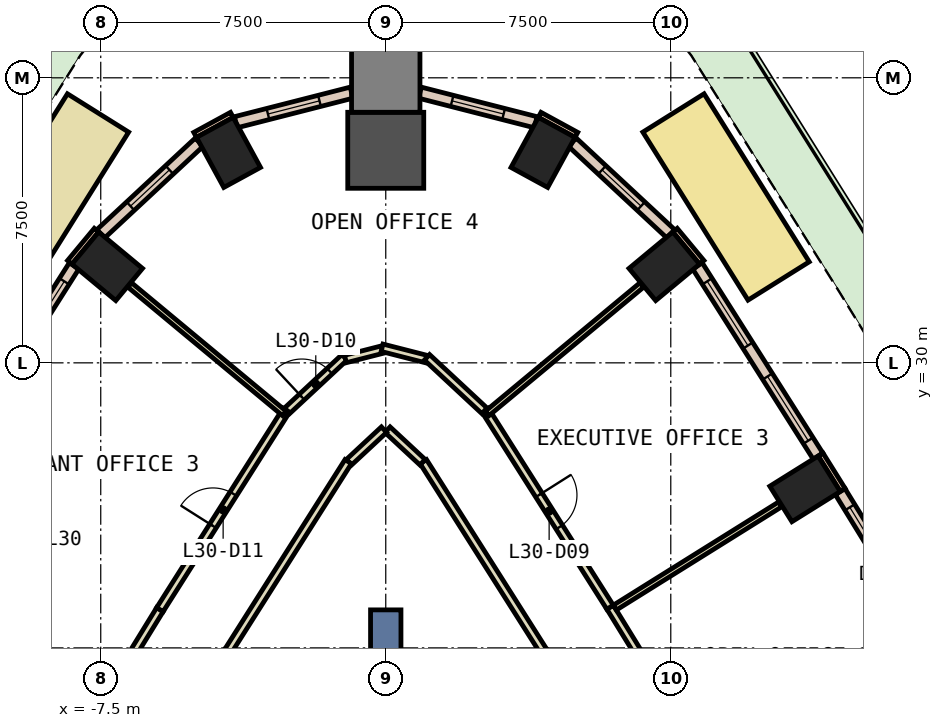
"""IFC4 building model, lengths in metres.
Left out: names, types, materials, properties, quantities, classifications, styles, units other than length and angle.
Written with IfcOpenShell. Run it as: python <this file> out.ifc"""

import sys

from ifc_helpers import new_model, si_unit, direction, frame, frame_2d, origin, origin_2d, place, context, subcontext, project, spatial, rectangle, extrude, element, fill, save


model = new_model("IFC4")
c1 = context("Model", 3, precision=1e-05, world=origin(), true_north=direction((0.0, 1.0)))
c2 = subcontext(c1, "Body", "Model", "MODEL_VIEW")
j1 = project(units=[si_unit("LENGTHUNIT", "METRE"), si_unit("PLANEANGLEUNIT", "RADIAN")], contexts=[c1])
p1 = place(None, origin())
s1 = spatial("IfcSite", under=j1, at=p1, CompositionType="ELEMENT")
p2 = place(p1, origin())
s2 = spatial("IfcBuilding", under=s1, at=p2, CompositionType="ELEMENT")
p3 = place(p2, frame((0.0, 0.0, 138.2)))
s3 = spatial("IfcBuildingStorey", under=s2, at=p3, CompositionType="ELEMENT", Elevation=138.2)
for number, where, z_axis, x_axis in (
    (1, (11.033, 26.684, 0.0), (0.0, 0.0, 1.0), (-0.53, 0.848, 0.0)),
    (2, (7.329, 32.541, 0.0), (0.0, 0.0, 1.0), (-0.639, 0.769, 0.0)),
    (3, (4.138, 35.537, 0.0), (0.0, 0.0, 1.0), (-0.878, 0.479, 0.0)),
):
    element("IfcColumn", number, at=place(p3, frame(where, z_axis=z_axis, x_axis=x_axis)), inside=s3, PredefinedType="COLUMN", context=c2, shape_type="SweptSolid", body=[
        extrude(rectangle(XDim=1.1, YDim=1.5, at=origin_2d()), origin(), (0.0, 0.0, 1.0), 3.8),
    ])
p4 = place(p3, frame((0.0, 35.593, 0.0), z_axis=(0.0, 0.0, 1.0), x_axis=(0.0, 1.0, 0.0)))
e4 = element("IfcColumn", 4, at=p4, inside=s3, PredefinedType="COLUMN", context=c2, shape_type="SweptSolid", body=[
    extrude(rectangle(XDim=2.0, YDim=2.0, at=origin_2d()), origin(), (0.0, 0.0, 1.0), 3.8),
])
for number, where, z_axis, x_axis in (
    (5, (-4.138, 35.537, 0.0), (0.0, 0.0, 1.0), (0.878, 0.479, 0.0)),
    (6, (-7.329, 32.541, 0.0), (0.0, 0.0, 1.0), (0.639, 0.769, 0.0)),
):
    element("IfcColumn", number, at=place(p3, frame(where, z_axis=z_axis, x_axis=x_axis)), inside=s3, PredefinedType="COLUMN", context=c2, shape_type="SweptSolid", body=[
        extrude(rectangle(XDim=1.1, YDim=1.5, at=origin_2d()), origin(), (0.0, 0.0, 1.0), 3.8),
    ])
p5 = place(p3, frame((0.0, 37.493, 0.0), z_axis=(0.0, 0.0, 1.0), x_axis=(0.0, 1.0, 0.0)))
e7 = element("IfcColumn", 7, at=p5, inside=s3, PredefinedType="COLUMN", context=c2, shape_type="SweptSolid", body=[
    extrude(rectangle(XDim=1.8, YDim=1.8, at=origin_2d()), origin(), (0.0, 0.0, 1.0), 3.8),
])
p6 = place(p3, frame((0.0, 14.5, -0.6), z_axis=(0.0, 0.0, 1.0), x_axis=(0.0, 1.0, 0.0)))
e8 = element("IfcWall", 8, at=p6, inside=s3, PredefinedType="SHEAR", context=c2, shape_type="SweptSolid", body=[
    extrude(rectangle(XDim=9.0, YDim=0.8, at=frame_2d((4.5, 0.0))), origin(), (0.0, 0.0, 1.0), 4.4),
])
for number, where, z_axis, x_axis in (
    (9, (5.016, 35.998, 0.0), (0.0, 0.0, 1.0), (-0.878, 0.479, 0.0)),
    (10, (-4.05, 36.525, 0.0), (0.0, 0.0, 1.0), (-0.878, -0.479, 0.0)),
):
    element("IfcWall", number, at=place(p3, frame(where, z_axis=z_axis, x_axis=x_axis)), inside=s3, PredefinedType="STANDARD", context=c2, shape_type="SweptSolid", body=[
        extrude(rectangle(XDim=1.1, YDim=0.15, at=frame_2d((0.55, 0.0))), origin(), (0.0, 0.0, 1.0), 3.8),
    ])
p7 = place(p3, frame((12.024, 26.655, 0.0), z_axis=(0.0, 0.0, 1.0), x_axis=(-0.52997899071, 0.848010771987, 0.0)))
e11 = element("IfcWall", 11, at=p7, inside=s3, PredefinedType="STANDARD", context=c2, shape_type="SweptSolid", body=[
    extrude(rectangle(XDim=1.1, YDim=0.15, at=frame_2d((0.55, 0.0))), origin(), (0.0, 0.0, 1.0), 3.8),
])
for number, where, z_axis, x_axis in (
    (12, (8.315, 32.645, 0.0), (0.0, 0.0, 1.0), (-0.639, 0.769, 0.0)),
    (13, (-7.612, 33.491, 0.0), (0.0, 0.0, 1.0), (-0.639, -0.769, 0.0)),
):
    element("IfcWall", number, at=place(p3, frame(where, z_axis=z_axis, x_axis=x_axis)), inside=s3, PredefinedType="STANDARD", context=c2, shape_type="SweptSolid", body=[
        extrude(rectangle(XDim=1.1, YDim=0.15, at=frame_2d((0.55, 0.0))), origin(), (0.0, 0.0, 1.0), 3.8),
    ])
p8 = place(p3, frame((15.073, 21.544, 0.0), z_axis=(0.0, 0.0, 1.0), x_axis=(-0.523719731127, 0.851890628677, 0.0)))
e14 = element("IfcWall", 14, at=p8, inside=s3, PredefinedType="STANDARD", context=c2, shape_type="SweptSolid", body=[
    extrude(rectangle(XDim=5.952, YDim=0.3, at=frame_2d((2.976, 0.0))), origin(), (0.0, 0.0, 1.0), 3.8),
])
p9 = place(p8, frame((0.488, 0.0, 0.0)))
e15 = element("IfcOpeningElement", 15, at=p9, cuts=e14, PredefinedType="OPENING", context=c2, shape_type="SweptSolid", body=[
    extrude(rectangle(XDim=2.0, YDim=2.4, at=frame_2d((1.0, 1.2))), frame((0.0, 0.16, 0.0), z_axis=(0.0, -1.0, 0.0), x_axis=(1.0, 0.0, 0.0)), (0.0, 0.0, 1.0), 0.32),
])
p10 = place(p8, frame((3.464, 0.0, 0.9)))
e16 = element("IfcOpeningElement", 16, at=p10, cuts=e14, PredefinedType="OPENING", context=c2, shape_type="SweptSolid", body=[
    extrude(rectangle(XDim=2.0, YDim=2.6, at=frame_2d((1.0, 1.3))), frame((0.0, 0.16, 0.0), z_axis=(0.0, -1.0, 0.0), x_axis=(1.0, 0.0, 0.0)), (0.0, 0.0, 1.0), 0.32),
])
p11 = place(p3, frame((11.375, 27.545, 0.0), z_axis=(0.0, 0.0, 1.0), x_axis=(-0.535403761464, 0.844596242124, 0.0)))
e17 = element("IfcWall", 17, at=p11, inside=s3, PredefinedType="STANDARD", context=c2, shape_type="SweptSolid", body=[
    extrude(rectangle(XDim=5.928, YDim=0.3, at=frame_2d((2.964, 0.0))), origin(), (0.0, 0.0, 1.0), 3.8),
])
p12 = place(p11, frame((0.482, 0.0, 0.9)))
e18 = element("IfcOpeningElement", 18, at=p12, cuts=e17, PredefinedType="OPENING", context=c2, shape_type="SweptSolid", body=[
    extrude(rectangle(XDim=2.0, YDim=2.6, at=frame_2d((1.0, 1.3))), frame((0.0, 0.16, 0.0), z_axis=(0.0, -1.0, 0.0), x_axis=(1.0, 0.0, 0.0)), (0.0, 0.0, 1.0), 0.32),
])
p13 = place(p11, frame((3.446, 0.0, 0.9)))
e19 = element("IfcOpeningElement", 19, at=p13, cuts=e17, PredefinedType="OPENING", context=c2, shape_type="SweptSolid", body=[
    extrude(rectangle(XDim=2.0, YDim=2.6, at=frame_2d((1.0, 1.3))), frame((0.0, 0.16, 0.0), z_axis=(0.0, -1.0, 0.0), x_axis=(1.0, 0.0, 0.0)), (0.0, 0.0, 1.0), 0.32),
])
p14 = place(p3, frame((7.499, 33.396, 0.0), z_axis=(0.0, 0.0, 1.0), x_axis=(-0.732121882671, 0.681173655475, 0.0)))
e20 = element("IfcWall", 20, at=p14, inside=s3, PredefinedType="STANDARD", context=c2, shape_type="SweptSolid", body=[
    extrude(rectangle(XDim=3.536, YDim=0.3, at=frame_2d((1.768, 0.0))), origin(), (0.0, 0.0, 1.0), 3.8),
])
p15 = place(p14, frame((1.068, 0.0, 0.9)))
e21 = element("IfcOpeningElement", 21, at=p15, cuts=e20, PredefinedType="OPENING", context=c2, shape_type="SweptSolid", body=[
    extrude(rectangle(XDim=1.4, YDim=2.6, at=frame_2d((0.7, 1.3))), frame((0.0, 0.16, 0.0), z_axis=(0.0, -1.0, 0.0), x_axis=(1.0, 0.0, 0.0)), (0.0, 0.0, 1.0), 0.32),
])
p16 = place(p3, frame((3.946, 36.331, 0.0), z_axis=(0.0, 0.0, 1.0), x_axis=(-0.968929586963, 0.247336724947, 0.0)))
e22 = element("IfcWall", 22, at=p16, inside=s3, PredefinedType="STANDARD", context=c2, shape_type="SweptSolid", body=[
    extrude(rectangle(XDim=3.145, YDim=0.3, at=frame_2d((1.572, 0.0))), origin(), (0.0, 0.0, 1.0), 3.8),
])
p17 = place(p16, frame((0.872, 0.0, 0.9)))
e23 = element("IfcOpeningElement", 23, at=p17, cuts=e22, PredefinedType="OPENING", context=c2, shape_type="SweptSolid", body=[
    extrude(rectangle(XDim=1.4, YDim=2.6, at=frame_2d((0.7, 1.3))), frame((0.0, 0.16, 0.0), z_axis=(0.0, -1.0, 0.0), x_axis=(1.0, 0.0, 0.0)), (0.0, 0.0, 1.0), 0.32),
])
p18 = place(p3, frame((-0.899, 37.109, 0.0), z_axis=(0.0, 0.0, 1.0), x_axis=(-0.968929586963, -0.247336724947, 0.0)))
e24 = element("IfcWall", 24, at=p18, inside=s3, PredefinedType="STANDARD", context=c2, shape_type="SweptSolid", body=[
    extrude(rectangle(XDim=3.145, YDim=0.3, at=frame_2d((1.572, 0.0))), origin(), (0.0, 0.0, 1.0), 3.8),
])
p19 = place(p18, frame((0.872, 0.0, 0.9)))
e25 = element("IfcOpeningElement", 25, at=p19, cuts=e24, PredefinedType="OPENING", context=c2, shape_type="SweptSolid", body=[
    extrude(rectangle(XDim=1.4, YDim=2.6, at=frame_2d((0.7, 1.3))), frame((0.0, 0.16, 0.0), z_axis=(0.0, -1.0, 0.0), x_axis=(1.0, 0.0, 0.0)), (0.0, 0.0, 1.0), 0.32),
])
p20 = place(p3, frame((-4.91, 35.805, 0.0), z_axis=(0.0, 0.0, 1.0), x_axis=(-0.732121882671, -0.681173655475, 0.0)))
e26 = element("IfcWall", 26, at=p20, inside=s3, PredefinedType="STANDARD", context=c2, shape_type="SweptSolid", body=[
    extrude(rectangle(XDim=3.536, YDim=0.3, at=frame_2d((1.768, 0.0))), origin(), (0.0, 0.0, 1.0), 3.8),
])
p21 = place(p20, frame((1.068, 0.0, 0.9)))
e27 = element("IfcOpeningElement", 27, at=p21, cuts=e26, PredefinedType="OPENING", context=c2, shape_type="SweptSolid", body=[
    extrude(rectangle(XDim=1.4, YDim=2.6, at=frame_2d((0.7, 1.3))), frame((0.0, 0.16, 0.0), z_axis=(0.0, -1.0, 0.0), x_axis=(1.0, 0.0, 0.0)), (0.0, 0.0, 1.0), 0.32),
])
p22 = place(p3, frame((-8.201, 32.552, 0.0), z_axis=(0.0, 0.0, 1.0), x_axis=(-0.535403761464, -0.844596242124, 0.0)))
e28 = element("IfcWall", 28, at=p22, inside=s3, PredefinedType="STANDARD", context=c2, shape_type="SweptSolid", body=[
    extrude(rectangle(XDim=5.928, YDim=0.3, at=frame_2d((2.964, 0.0))), origin(), (0.0, 0.0, 1.0), 3.8),
])
p23 = place(p22, frame((0.482, 0.0, 0.9)))
e29 = element("IfcOpeningElement", 29, at=p23, cuts=e28, PredefinedType="OPENING", context=c2, shape_type="SweptSolid", body=[
    extrude(rectangle(XDim=2.0, YDim=2.6, at=frame_2d((1.0, 1.3))), frame((0.0, 0.16, 0.0), z_axis=(0.0, -1.0, 0.0), x_axis=(1.0, 0.0, 0.0)), (0.0, 0.0, 1.0), 0.32),
])
p24 = place(p22, frame((3.446, 0.0, 0.9)))
e30 = element("IfcOpeningElement", 30, at=p24, cuts=e28, PredefinedType="OPENING", context=c2, shape_type="SweptSolid", body=[
    extrude(rectangle(XDim=2.0, YDim=2.6, at=frame_2d((1.0, 1.3))), frame((0.0, 0.16, 0.0), z_axis=(0.0, -1.0, 0.0), x_axis=(1.0, 0.0, 0.0)), (0.0, 0.0, 1.0), 0.32),
])
for number, where, z_axis, x_axis in (
    (31, (10.338, 32.154, 0.0), (0.0, 0.0, 1.0), (-0.531, 0.848, 0.0)),
    (32, (-7.571, 36.575, 0.0), (0.0, 0.0, 1.0), (-0.531, -0.848, 0.0)),
):
    element("IfcWall", number, at=place(p3, frame(where, z_axis=z_axis, x_axis=x_axis)), inside=s3, PredefinedType="STANDARD", context=c2, shape_type="SweptSolid", body=[
        extrude(rectangle(XDim=5.215, YDim=1.9, at=frame_2d((2.608, 0.0))), origin(), (0.0, 0.0, 1.0), 0.8),
    ])
p25 = place(p3, frame((4.162, 22.395, 0.0), z_axis=(0.0, 0.0, 1.0), x_axis=(-0.535496886312, 0.844537201519, 0.0)))
e33 = element("IfcWall", 33, at=p25, inside=s3, PredefinedType="PARTITIONING", context=c2, shape_type="SweptSolid", body=[
    extrude(rectangle(XDim=5.927, YDim=0.2, at=frame_2d((2.964, 0.0))), origin(), (0.0, 0.0, 1.0), 3.8),
])
for number, where, z_axis, x_axis in (
    (34, (0.968, 27.385, 0.0), (0.0, 0.0, 1.0), (-0.733, 0.681, 0.0)),
    (35, (-0.046, 28.242, 0.0), (0.0, 0.0, 1.0), (-0.733, -0.681, 0.0)),
):
    element("IfcWall", number, at=place(p3, frame(where, z_axis=z_axis, x_axis=x_axis)), inside=s3, PredefinedType="PARTITIONING", context=c2, shape_type="SweptSolid", body=[
        extrude(rectangle(XDim=1.259, YDim=0.2, at=frame_2d((0.629, 0.0))), origin(), (0.0, 0.0, 1.0), 3.8),
    ])
p26 = place(p3, frame((-0.988, 27.401, 0.0), z_axis=(0.0, 0.0, 1.0), x_axis=(-0.535496886312, -0.844537201519, 0.0)))
e36 = element("IfcWall", 36, at=p26, inside=s3, PredefinedType="PARTITIONING", context=c2, shape_type="SweptSolid", body=[
    extrude(rectangle(XDim=5.927, YDim=0.2, at=frame_2d((2.964, 0.0))), origin(), (0.0, 0.0, 1.0), 3.8),
])
p27 = place(p3, frame((5.904, 23.571, 0.0), z_axis=(0.0, 0.0, 1.0), x_axis=(0.523647026552, -0.851935321244, 0.0)))
e37 = element("IfcWall", 37, at=p27, inside=s3, PredefinedType="PARTITIONING", context=c2, shape_type="SweptSolid", body=[
    extrude(rectangle(XDim=6.957, YDim=0.2, at=frame_2d((3.479, 0.0))), origin(), (0.0, 0.0, 1.0), 3.8),
])
p28 = place(p27, frame((3.053, 0.0, 0.0)))
e38 = element("IfcOpeningElement", 38, at=p28, cuts=e37, PredefinedType="OPENING", context=c2, shape_type="SweptSolid", body=[
    extrude(rectangle(XDim=1.0, YDim=2.1, at=frame_2d((0.5, 1.05))), frame((0.0, 0.11, 0.0), z_axis=(0.0, -1.0, 0.0), x_axis=(1.0, 0.0, 0.0)), (0.0, 0.0, 1.0), 0.22),
])
p29 = place(p3, frame((2.616, 28.754, 0.0), z_axis=(0.0, 0.0, 1.0), x_axis=(0.535405016332, -0.844595446641, 0.0)))
e39 = element("IfcWall", 39, at=p29, inside=s3, PredefinedType="PARTITIONING", context=c2, shape_type="SweptSolid", body=[
    extrude(rectangle(XDim=6.138, YDim=0.2, at=frame_2d((3.069, 0.0))), origin(), (0.0, 0.0, 1.0), 3.8),
])
p30 = place(p29, frame((2.644, 0.0, 0.0)))
e40 = element("IfcOpeningElement", 40, at=p30, cuts=e39, PredefinedType="OPENING", context=c2, shape_type="SweptSolid", body=[
    extrude(rectangle(XDim=1.0, YDim=2.1, at=frame_2d((0.5, 1.05))), frame((0.0, 0.11, 0.0), z_axis=(0.0, -1.0, 0.0), x_axis=(1.0, 0.0, 0.0)), (0.0, 0.0, 1.0), 0.22),
])
p31 = place(p3, frame((-2.597, 28.738, 0.0), z_axis=(0.0, 0.0, 1.0), x_axis=(0.73206471367, 0.681235095249, 0.0)))
e41 = element("IfcWall", 41, at=p31, inside=s3, PredefinedType="PARTITIONING", context=c2, shape_type="SweptSolid", body=[
    extrude(rectangle(XDim=2.065, YDim=0.2, at=frame_2d((1.033, 0.0))), origin(), (0.0, 0.0, 1.0), 3.8),
])
p32 = place(p31, frame((0.532, 0.0, 0.0)))
e42 = element("IfcOpeningElement", 42, at=p32, cuts=e41, PredefinedType="OPENING", context=c2, shape_type="SweptSolid", body=[
    extrude(rectangle(XDim=1.0, YDim=2.1, at=frame_2d((0.5, 1.05))), frame((0.0, 0.11, 0.0), z_axis=(0.0, -1.0, 0.0), x_axis=(1.0, 0.0, 0.0)), (0.0, 0.0, 1.0), 0.22),
])
p33 = place(p3, frame((-1.061, 30.101, 0.0), z_axis=(0.0, 0.0, 1.0), x_axis=(0.968991499392, 0.247094059227, 0.0)))
e43 = element("IfcWall", 43, at=p33, inside=s3, PredefinedType="PARTITIONING", context=c2, shape_type="SweptSolid", body=[
    extrude(rectangle(XDim=0.995, YDim=0.2, at=frame_2d((0.498, 0.0))), origin(), (0.0, 0.0, 1.0), 3.8),
])
p34 = place(p3, frame((-0.097, 30.397, 0.0), z_axis=(0.0, 0.0, 1.0), x_axis=(0.968867686006, -0.247579092439, 0.0)))
e44 = element("IfcWall", 44, at=p34, inside=s3, PredefinedType="PARTITIONING", context=c2, shape_type="SweptSolid", body=[
    extrude(rectangle(XDim=1.195, YDim=0.2, at=frame_2d((0.598, 0.0))), origin(), (0.0, 0.0, 1.0), 3.8),
])
p35 = place(p3, frame((1.085, 30.145, 0.0), z_axis=(0.0, 0.0, 1.0), x_axis=(0.73206471367, -0.681235095249, 0.0)))
e45 = element("IfcWall", 45, at=p35, inside=s3, PredefinedType="PARTITIONING", context=c2, shape_type="SweptSolid", body=[
    extrude(rectangle(XDim=2.065, YDim=0.2, at=frame_2d((1.033, 0.0))), origin(), (0.0, 0.0, 1.0), 3.8),
])
p36 = place(p3, frame((-7.725, 20.608, 0.0), z_axis=(0.0, 0.0, 1.0), x_axis=(0.523645038298, 0.851936543333, 0.0)))
e46 = element("IfcWall", 46, at=p36, inside=s3, PredefinedType="PARTITIONING", context=c2, shape_type="SweptSolid", body=[
    extrude(rectangle(XDim=3.403, YDim=0.2, at=frame_2d((1.702, 0.0))), origin(), (0.0, 0.0, 1.0), 3.8),
])
p37 = place(p3, frame((-5.943, 23.507, 0.0), z_axis=(0.0, 0.0, 1.0), x_axis=(0.535529721247, 0.844516380931, 0.0)))
e47 = element("IfcWall", 47, at=p37, inside=s3, PredefinedType="PARTITIONING", context=c2, shape_type="SweptSolid", body=[
    extrude(rectangle(XDim=6.213, YDim=0.2, at=frame_2d((3.106, 0.0))), origin(), (0.0, 0.0, 1.0), 3.8),
])
p38 = place(p37, frame((2.607, 0.0, 0.0)))
e48 = element("IfcOpeningElement", 48, at=p38, cuts=e47, PredefinedType="OPENING", context=c2, shape_type="SweptSolid", body=[
    extrude(rectangle(XDim=1.0, YDim=2.1, at=frame_2d((0.5, 1.05))), frame((0.0, 0.11, 0.0), z_axis=(0.0, -1.0, 0.0), x_axis=(1.0, 0.0, 0.0)), (0.0, 0.0, 1.0), 0.22),
])
p39 = place(p3, frame((6.028, 23.56, 0.0), z_axis=(0.0, 0.0, 1.0), x_axis=(0.848246841914, 0.529601071734, 0.0)))
e49 = element("IfcWall", 49, at=p39, inside=s3, PredefinedType="PARTITIONING", context=c2, shape_type="SweptSolid", body=[
    extrude(rectangle(XDim=5.13, YDim=0.15, at=frame_2d((2.565, 0.0))), origin(), (0.0, 0.0, 1.0), 3.8),
])
for number, where, z_axis, x_axis in (
    (50, (2.67, 28.67, 0.0), (0.0, 0.0, 1.0), (0.769, 0.639, 0.0)),
    (51, (-2.67, 28.67, 0.0), (0.0, 0.0, 1.0), (-0.769, 0.639, 0.0)),
):
    element("IfcWall", number, at=place(p3, frame(where, z_axis=z_axis, x_axis=x_axis)), inside=s3, PredefinedType="PARTITIONING", context=c2, shape_type="SweptSolid", body=[
        extrude(rectangle(XDim=5.288, YDim=0.15, at=frame_2d((2.644, 0.0))), origin(), (0.0, 0.0, 1.0), 3.8),
    ])
p40 = place(p3, frame((-7.679, 20.492, 0.0), z_axis=(0.0, 0.0, 1.0), x_axis=(-0.851897179877, 0.523709074695, 0.0)))
e52 = element("IfcWall", 52, at=p40, inside=s3, PredefinedType="PARTITIONING", context=c2, shape_type="SweptSolid", body=[
    extrude(rectangle(XDim=6.7, YDim=0.15, at=frame_2d((3.35, 0.0))), origin(), (0.0, 0.0, 1.0), 3.8),
])
p41 = place(p10, origin())
e53 = element("IfcWindow", 53, at=p41, inside=s3, PartitioningType="SINGLE_PANEL", PredefinedType="WINDOW", context=c2, shape_type="SweptSolid", body=[
    extrude(rectangle(XDim=2.0, YDim=2.6, at=frame_2d((1.0, 1.3))), frame((0.0, 0.03, 0.0), z_axis=(0.0, -1.0, 0.0), x_axis=(1.0, 0.0, 0.0)), (0.0, 0.0, 1.0), 0.06),
])
fill(e16, e53)
p42 = place(p12, origin())
e54 = element("IfcWindow", 54, at=p42, inside=s3, PartitioningType="SINGLE_PANEL", PredefinedType="WINDOW", context=c2, shape_type="SweptSolid", body=[
    extrude(rectangle(XDim=2.0, YDim=2.6, at=frame_2d((1.0, 1.3))), frame((0.0, 0.03, 0.0), z_axis=(0.0, -1.0, 0.0), x_axis=(1.0, 0.0, 0.0)), (0.0, 0.0, 1.0), 0.06),
])
fill(e18, e54)
p43 = place(p13, origin())
e55 = element("IfcWindow", 55, at=p43, inside=s3, PartitioningType="SINGLE_PANEL", PredefinedType="WINDOW", context=c2, shape_type="SweptSolid", body=[
    extrude(rectangle(XDim=2.0, YDim=2.6, at=frame_2d((1.0, 1.3))), frame((0.0, 0.03, 0.0), z_axis=(0.0, -1.0, 0.0), x_axis=(1.0, 0.0, 0.0)), (0.0, 0.0, 1.0), 0.06),
])
fill(e19, e55)
p44 = place(p15, origin())
e56 = element("IfcWindow", 56, at=p44, inside=s3, PartitioningType="SINGLE_PANEL", PredefinedType="WINDOW", context=c2, shape_type="SweptSolid", body=[
    extrude(rectangle(XDim=1.4, YDim=2.6, at=frame_2d((0.7, 1.3))), frame((0.0, 0.03, 0.0), z_axis=(0.0, -1.0, 0.0), x_axis=(1.0, 0.0, 0.0)), (0.0, 0.0, 1.0), 0.06),
])
fill(e21, e56)
p45 = place(p17, origin())
e57 = element("IfcWindow", 57, at=p45, inside=s3, PartitioningType="SINGLE_PANEL", PredefinedType="WINDOW", context=c2, shape_type="SweptSolid", body=[
    extrude(rectangle(XDim=1.4, YDim=2.6, at=frame_2d((0.7, 1.3))), frame((0.0, 0.03, 0.0), z_axis=(0.0, -1.0, 0.0), x_axis=(1.0, 0.0, 0.0)), (0.0, 0.0, 1.0), 0.06),
])
fill(e23, e57)
p46 = place(p19, origin())
e58 = element("IfcWindow", 58, at=p46, inside=s3, PartitioningType="SINGLE_PANEL", PredefinedType="WINDOW", context=c2, shape_type="SweptSolid", body=[
    extrude(rectangle(XDim=1.4, YDim=2.6, at=frame_2d((0.7, 1.3))), frame((0.0, 0.03, 0.0), z_axis=(0.0, -1.0, 0.0), x_axis=(1.0, 0.0, 0.0)), (0.0, 0.0, 1.0), 0.06),
])
fill(e25, e58)
p47 = place(p21, origin())
e59 = element("IfcWindow", 59, at=p47, inside=s3, PartitioningType="SINGLE_PANEL", PredefinedType="WINDOW", context=c2, shape_type="SweptSolid", body=[
    extrude(rectangle(XDim=1.4, YDim=2.6, at=frame_2d((0.7, 1.3))), frame((0.0, 0.03, 0.0), z_axis=(0.0, -1.0, 0.0), x_axis=(1.0, 0.0, 0.0)), (0.0, 0.0, 1.0), 0.06),
])
fill(e27, e59)
p48 = place(p23, origin())
e60 = element("IfcWindow", 60, at=p48, inside=s3, PartitioningType="SINGLE_PANEL", PredefinedType="WINDOW", context=c2, shape_type="SweptSolid", body=[
    extrude(rectangle(XDim=2.0, YDim=2.6, at=frame_2d((1.0, 1.3))), frame((0.0, 0.03, 0.0), z_axis=(0.0, -1.0, 0.0), x_axis=(1.0, 0.0, 0.0)), (0.0, 0.0, 1.0), 0.06),
])
fill(e29, e60)
p49 = place(p30, origin())
e61 = element("IfcDoor", 61, at=p49, inside=s3, OperationType="SINGLE_SWING_LEFT", PredefinedType="DOOR", context=c2, shape_type="SweptSolid", body=[
    extrude(rectangle(XDim=1.0, YDim=2.1, at=frame_2d((0.5, 1.05))), frame((0.0, 0.025, 0.0), z_axis=(0.0, -1.0, 0.0), x_axis=(1.0, 0.0, 0.0)), (0.0, 0.0, 1.0), 0.05),
])
fill(e40, e61)
p50 = place(p32, origin())
e62 = element("IfcDoor", 62, at=p50, inside=s3, OperationType="SINGLE_SWING_LEFT", PredefinedType="DOOR", context=c2, shape_type="SweptSolid", body=[
    extrude(rectangle(XDim=1.0, YDim=2.1, at=frame_2d((0.5, 1.05))), frame((0.0, 0.025, 0.0), z_axis=(0.0, -1.0, 0.0), x_axis=(1.0, 0.0, 0.0)), (0.0, 0.0, 1.0), 0.05),
])
fill(e42, e62)
p51 = place(p38, origin())
e63 = element("IfcDoor", 63, at=p51, inside=s3, OperationType="SINGLE_SWING_LEFT", PredefinedType="DOOR", context=c2, shape_type="SweptSolid", body=[
    extrude(rectangle(XDim=1.0, YDim=2.1, at=frame_2d((0.5, 1.05))), frame((0.0, 0.025, 0.0), z_axis=(0.0, -1.0, 0.0), x_axis=(1.0, 0.0, 0.0)), (0.0, 0.0, 1.0), 0.05),
])
fill(e48, e63)
save(model, sys.argv[1])
